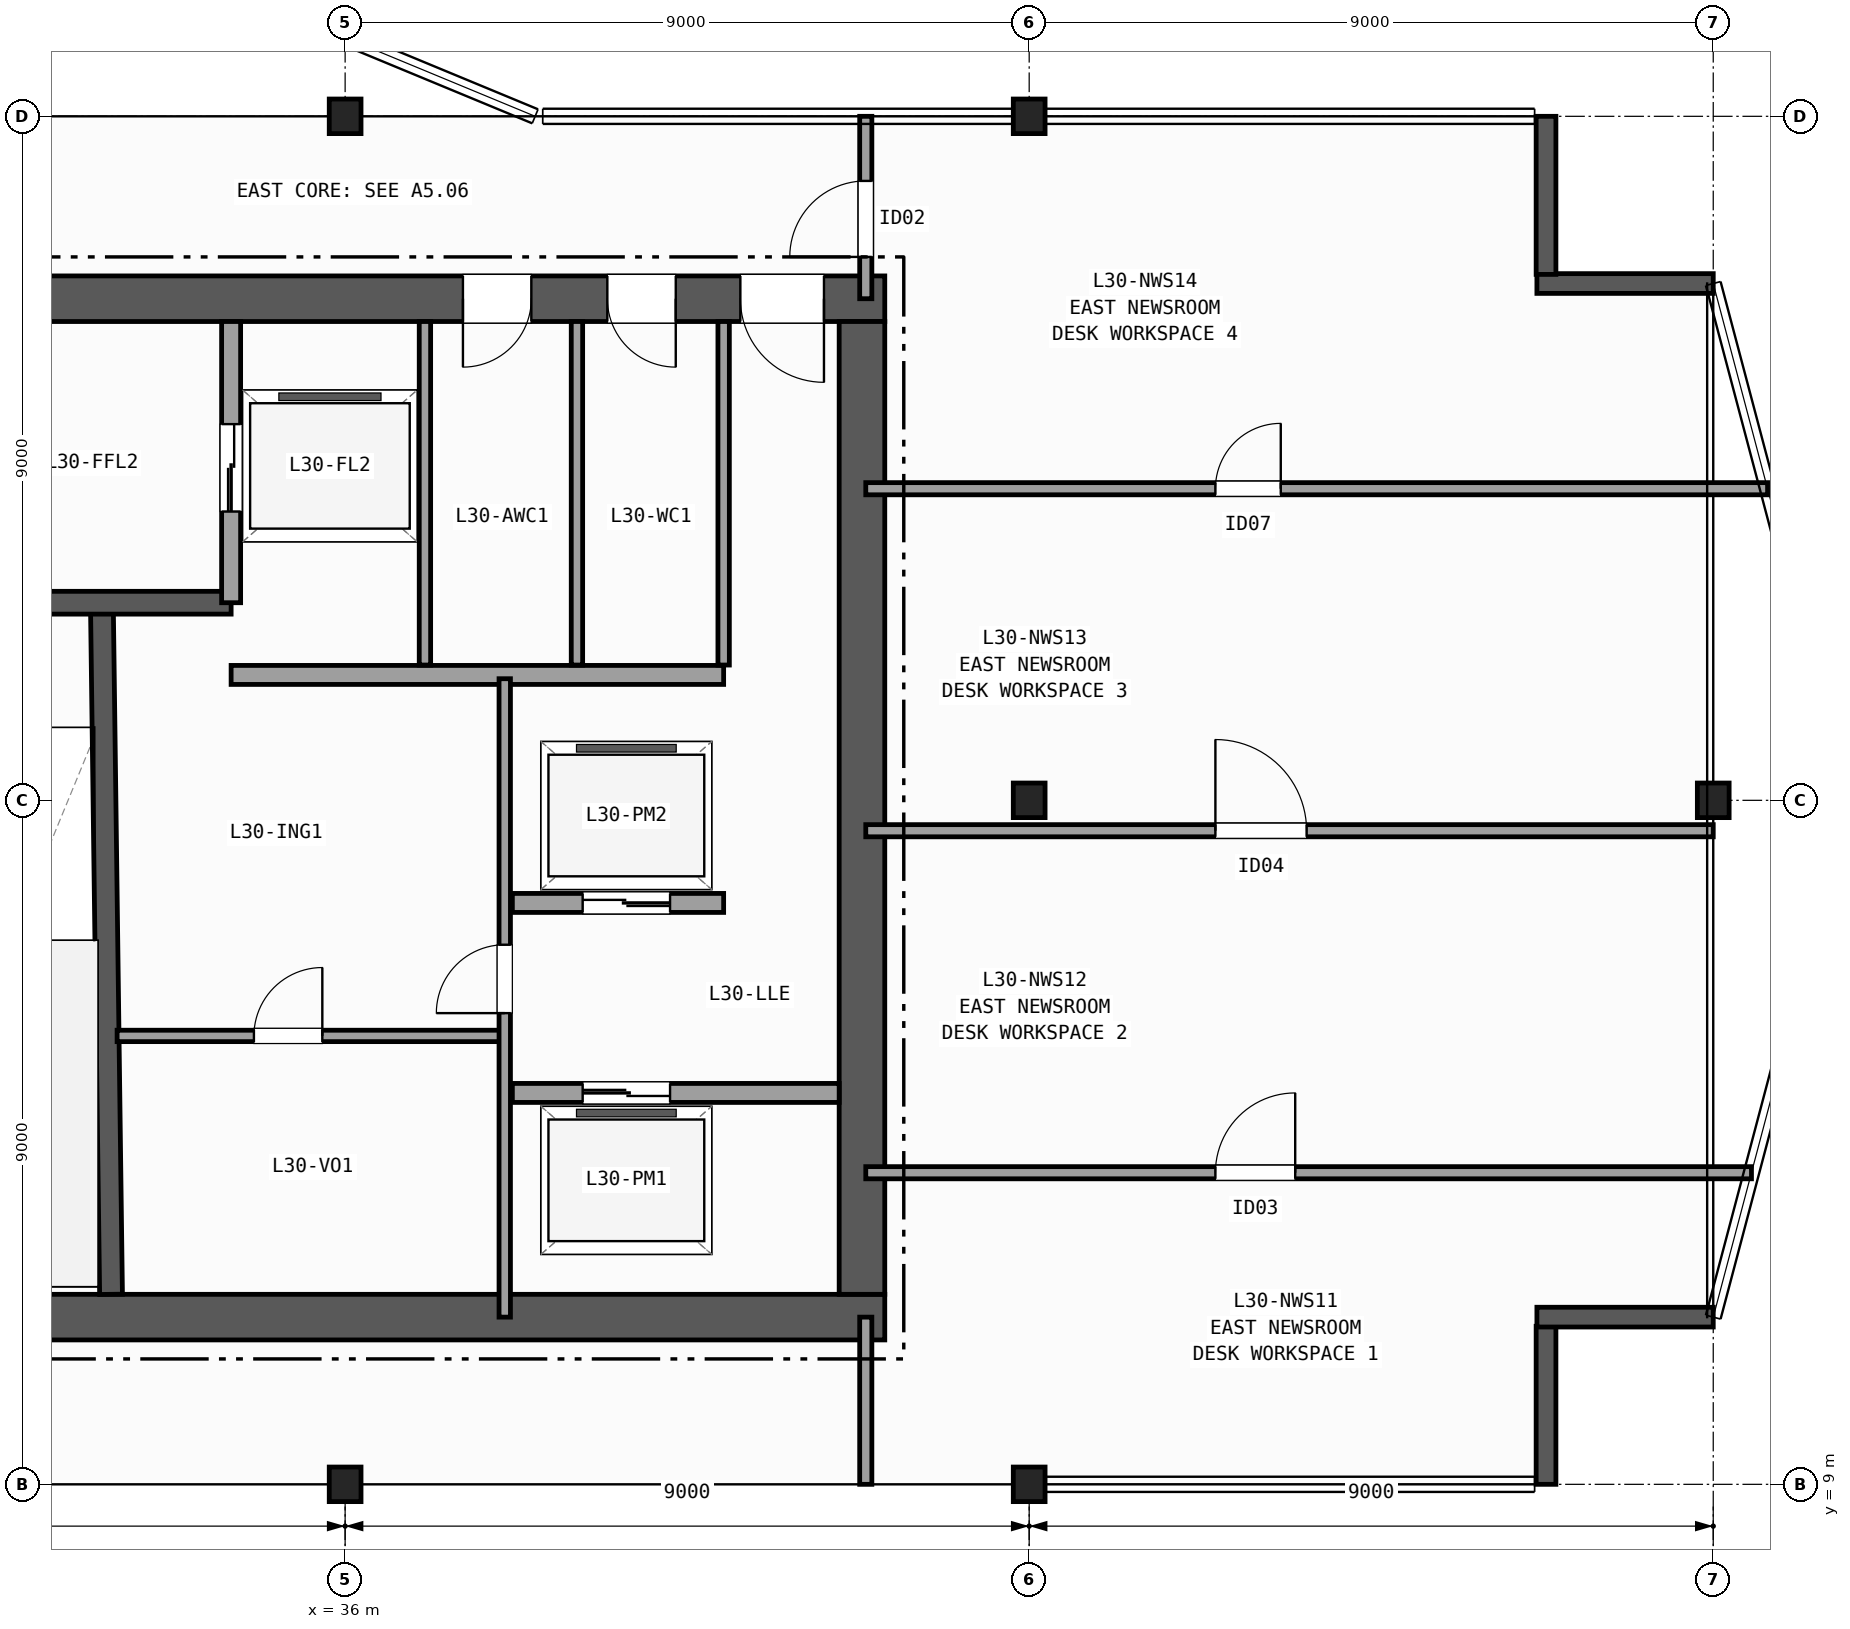
"""IFC4 building model, lengths in metres.
Left out: names, types, materials, properties, quantities, classifications, styles, units other than length and angle.
Written with IfcOpenShell. Run it as: python <this file> out.ifc"""

import sys

from ifc_helpers import new_model, si_unit, direction, frame, frame_2d, origin, origin_2d, place, context, subcontext, project, spatial, rectangle, i_section, extrude, element, fill, save


model = new_model("IFC4")
c1 = context("Model", 3, precision=1e-05, world=origin(), true_north=direction((0.0, 1.0)))
c2 = subcontext(c1, "Body", "Model", "MODEL_VIEW")
j1 = project(units=[si_unit("LENGTHUNIT", "METRE"), si_unit("PLANEANGLEUNIT", "RADIAN")], contexts=[c1])
p1 = place(None, origin())
s1 = spatial("IfcSite", under=j1, at=p1, CompositionType="ELEMENT")
p2 = place(p1, origin())
s2 = spatial("IfcBuilding", under=s1, at=p2, CompositionType="ELEMENT")
p3 = place(p2, frame((0.0, 0.0, 124.8)))
s3 = spatial("IfcBuildingStorey", under=s2, at=p3, CompositionType="ELEMENT", Elevation=124.8)
for number, where, z_axis, x_axis in (
    (1, (36.0, 9.0, 0.0), (0.0, 0.0, 1.0), (1.0, 0.0, 0.0)),
    (2, (36.0, 27.0, 0.0), (0.0, 0.0, 1.0), (1.0, 0.0, 0.0)),
    (3, (45.0, 9.0, 0.0), (0.0, 0.0, 1.0), (1.0, 0.0, 0.0)),
    (4, (45.0, 18.0, 0.0), (0.0, 0.0, 1.0), (1.0, 0.0, 0.0)),
    (5, (45.0, 27.0, 0.0), (0.0, 0.0, 1.0), (1.0, 0.0, 0.0)),
    (6, (54.0, 18.0, 0.0), (0.0, 0.0, 1.0), (1.0, 0.0, 0.0)),
):
    element("IfcColumn", number, at=place(p3, frame(where, z_axis=z_axis, x_axis=x_axis)), inside=s3, PredefinedType="COLUMN", context=c2, shape_type="SweptSolid", body=[
        extrude(i_section(OverallWidth=0.418, OverallDepth=0.455, WebThickness=0.042, FlangeThickness=0.068, FilletRadius=0.015, at=origin_2d()), origin(), (0.0, 0.0, 1.0), 3.7),
    ])
p4 = place(p3, frame((51.8, 9.0, 0.0), z_axis=(0.0, 0.0, 1.0), x_axis=(0.0, 1.0, 0.0)))
e7 = element("IfcWall", 7, at=p4, inside=s3, PredefinedType="SOLIDWALL", context=c2, shape_type="SweptSolid", body=[
    extrude(rectangle(XDim=2.08, YDim=0.26, at=frame_2d((1.04, 0.0))), origin(), (0.0, 0.0, 1.0), 3.42),
])
for number, where, z_axis, x_axis in (
    (8, (51.68, 11.2, 0.0), (0.0, 0.0, 1.0), (1.0, 0.0, 0.0)),
    (9, (54.0, 24.8, 0.0), (0.0, 0.0, 1.0), (-1.0, 0.0, 0.0)),
):
    element("IfcWall", number, at=place(p3, frame(where, z_axis=z_axis, x_axis=x_axis)), inside=s3, PredefinedType="SOLIDWALL", context=c2, shape_type="SweptSolid", body=[
        extrude(rectangle(XDim=2.32, YDim=0.26, at=frame_2d((1.16, 0.0))), origin(), (0.0, 0.0, 1.0), 3.42),
    ])
p5 = place(p3, frame((51.8, 24.92, 0.0), z_axis=(0.0, 0.0, 1.0), x_axis=(0.0, 1.0, 0.0)))
e10 = element("IfcWall", 10, at=p5, inside=s3, PredefinedType="SOLIDWALL", context=c2, shape_type="SweptSolid", body=[
    extrude(rectangle(XDim=2.08, YDim=0.26, at=frame_2d((1.04, 0.0))), origin(), (0.0, 0.0, 1.0), 3.42),
])
p6 = place(p3, frame((29.1, 11.2, 0.0), z_axis=(0.0, 0.0, 1.0), x_axis=(1.0, 0.0, 0.0)))
e11 = element("IfcWall", 11, at=p6, inside=s3, PredefinedType="SHEAR", context=c2, shape_type="SweptSolid", body=[
    extrude(rectangle(XDim=14.0, YDim=0.6, at=frame_2d((7.0, 0.0))), origin(), (0.0, 0.0, 1.0), 3.42),
])
p7 = place(p3, frame((43.1, 24.6, 0.0), z_axis=(0.0, 0.0, 1.0), x_axis=(-1.0, 0.0, 0.0)))
e12 = element("IfcWall", 12, at=p7, inside=s3, PredefinedType="SHEAR", context=c2, shape_type="SweptSolid", body=[
    extrude(rectangle(XDim=14.0, YDim=0.6, at=frame_2d((7.0, 0.0))), origin(), (0.0, 0.0, 1.0), 3.42),
])
p8 = place(p7, frame((0.8, 0.0, 0.0)))
e13 = element("IfcOpeningElement", 13, at=p8, cuts=e12, PredefinedType="OPENING", context=c2, shape_type="SweptSolid", body=[
    extrude(rectangle(XDim=1.1, YDim=2.15, at=frame_2d((0.55, 1.075))), frame((0.0, 0.31, 0.0), z_axis=(0.0, -1.0, 0.0), x_axis=(1.0, 0.0, 0.0)), (0.0, 0.0, 1.0), 0.62),
])
p9 = place(p7, frame((2.75, 0.0, 0.0)))
e14 = element("IfcOpeningElement", 14, at=p9, cuts=e12, PredefinedType="OPENING", context=c2, shape_type="SweptSolid", body=[
    extrude(rectangle(XDim=0.9, YDim=2.1, at=frame_2d((0.45, 1.05))), frame((0.0, 0.31, 0.0), z_axis=(0.0, -1.0, 0.0), x_axis=(1.0, 0.0, 0.0)), (0.0, 0.0, 1.0), 0.62),
])
p10 = place(p7, frame((4.65, 0.0, 0.0)))
e15 = element("IfcOpeningElement", 15, at=p10, cuts=e12, PredefinedType="OPENING", context=c2, shape_type="SweptSolid", body=[
    extrude(rectangle(XDim=0.9, YDim=2.1, at=frame_2d((0.45, 1.05))), frame((0.0, 0.31, 0.0), z_axis=(0.0, -1.0, 0.0), x_axis=(1.0, 0.0, 0.0)), (0.0, 0.0, 1.0), 0.62),
])
p11 = place(p3, frame((42.8, 11.5, 0.0), z_axis=(0.0, 0.0, 1.0), x_axis=(0.0, 1.0, 0.0)))
e16 = element("IfcWall", 16, at=p11, inside=s3, PredefinedType="SHEAR", context=c2, shape_type="SweptSolid", body=[
    extrude(rectangle(XDim=12.8, YDim=0.6, at=frame_2d((6.4, 0.0))), origin(), (0.0, 0.0, 1.0), 3.42),
])
p12 = place(p3, frame((32.92, 11.5, 0.0), z_axis=(0.0, 0.0, 1.0), x_axis=(-0.013244407292, 0.999912288991, 0.0)))
e17 = element("IfcWall", 17, at=p12, inside=s3, PredefinedType="SHEAR", context=c2, shape_type="SweptSolid", body=[
    extrude(rectangle(XDim=9.051, YDim=0.3, at=frame_2d((4.525, 0.0))), origin(), (0.0, 0.0, 1.0), 3.42),
])
p13 = place(p3, frame((34.5, 20.6, 0.0), z_axis=(0.0, 0.0, 1.0), x_axis=(-1.0, 0.0, 0.0)))
e18 = element("IfcWall", 18, at=p13, inside=s3, PredefinedType="SHEAR", context=c2, shape_type="SweptSolid", body=[
    extrude(rectangle(XDim=4.8, YDim=0.3, at=frame_2d((2.4, 0.0))), origin(), (0.0, 0.0, 1.0), 3.42),
])
p14 = place(p13, frame((2.7, 0.0, 0.0)))
e19 = element("IfcOpeningElement", 19, at=p14, cuts=e18, PredefinedType="OPENING", context=c2, shape_type="SweptSolid", body=[
    extrude(rectangle(XDim=1.2, YDim=2.15, at=frame_2d((0.6, 1.075))), frame((0.0, 0.16, 0.0), z_axis=(0.0, -1.0, 0.0), x_axis=(1.0, 0.0, 0.0)), (0.0, 0.0, 1.0), 0.32),
])
p15 = place(p3, frame((34.5, 20.6, 0.0), z_axis=(0.0, 0.0, 1.0), x_axis=(0.0, 1.0, 0.0)))
e20 = element("IfcWall", 20, at=p15, inside=s3, PredefinedType="PARTITIONING", context=c2, shape_type="SweptSolid", body=[
    extrude(rectangle(XDim=3.7, YDim=0.25, at=frame_2d((1.85, 0.0))), origin(), (0.0, 0.0, 1.0), 3.42),
])
p16 = place(p15, frame((1.2, 0.0, 0.0)))
e21 = element("IfcOpeningElement", 21, at=p16, cuts=e20, PredefinedType="OPENING", context=c2, shape_type="SweptSolid", body=[
    extrude(rectangle(XDim=1.15, YDim=2.15, at=frame_2d((0.575, 1.075))), frame((0.0, 0.135, 0.0), z_axis=(0.0, -1.0, 0.0), x_axis=(1.0, 0.0, 0.0)), (0.0, 0.0, 1.0), 0.27),
])
p17 = place(p3, frame((34.5, 19.65, 0.0), z_axis=(0.0, 0.0, 1.0), x_axis=(1.0, 0.0, 0.0)))
e22 = element("IfcWall", 22, at=p17, inside=s3, PredefinedType="PARTITIONING", context=c2, shape_type="SweptSolid", body=[
    extrude(rectangle(XDim=6.48, YDim=0.25, at=frame_2d((3.24, 0.0))), origin(), (0.0, 0.0, 1.0), 3.42),
])
p18 = place(p3, frame((38.2, 14.15, 0.0), z_axis=(0.0, 0.0, 1.0), x_axis=(1.0, 0.0, 0.0)))
e23 = element("IfcWall", 23, at=p18, inside=s3, PredefinedType="PARTITIONING", context=c2, shape_type="SweptSolid", body=[
    extrude(rectangle(XDim=4.3, YDim=0.25, at=frame_2d((2.15, 0.0))), origin(), (0.0, 0.0, 1.0), 3.42),
])
p19 = place(p18, frame((0.925, 0.0, 0.0)))
e24 = element("IfcOpeningElement", 24, at=p19, cuts=e23, PredefinedType="OPENING", context=c2, shape_type="SweptSolid", body=[
    extrude(rectangle(XDim=1.15, YDim=2.15, at=frame_2d((0.575, 1.075))), frame((0.0, 0.135, 0.0), z_axis=(0.0, -1.0, 0.0), x_axis=(1.0, 0.0, 0.0)), (0.0, 0.0, 1.0), 0.27),
])
p20 = place(p3, frame((40.98, 16.65, 0.0), z_axis=(0.0, 0.0, 1.0), x_axis=(-1.0, 0.0, 0.0)))
e25 = element("IfcWall", 25, at=p20, inside=s3, PredefinedType="PARTITIONING", context=c2, shape_type="SweptSolid", body=[
    extrude(rectangle(XDim=2.78, YDim=0.25, at=frame_2d((1.39, 0.0))), origin(), (0.0, 0.0, 1.0), 3.42),
])
p21 = place(p20, frame((0.705, 0.0, 0.0)))
e26 = element("IfcOpeningElement", 26, at=p21, cuts=e25, PredefinedType="OPENING", context=c2, shape_type="SweptSolid", body=[
    extrude(rectangle(XDim=1.15, YDim=2.15, at=frame_2d((0.575, 1.075))), frame((0.0, 0.135, 0.0), z_axis=(0.0, -1.0, 0.0), x_axis=(1.0, 0.0, 0.0)), (0.0, 0.0, 1.0), 0.27),
])
p22 = place(p3, frame((33.0, 14.9, 0.0), z_axis=(0.0, 0.0, 1.0), x_axis=(1.0, 0.0, 0.0)))
e27 = element("IfcWall", 27, at=p22, inside=s3, PredefinedType="PARTITIONING", context=c2, shape_type="SweptSolid", body=[
    extrude(rectangle(XDim=5.1, YDim=0.15, at=frame_2d((2.55, 0.0))), origin(), (0.0, 0.0, 1.0), 3.42),
])
p23 = place(p22, frame((1.8, 0.0, 0.0)))
e28 = element("IfcOpeningElement", 28, at=p23, cuts=e27, PredefinedType="OPENING", context=c2, shape_type="SweptSolid", body=[
    extrude(rectangle(XDim=0.9, YDim=2.1, at=frame_2d((0.45, 1.05))), frame((0.0, 0.085, 0.0), z_axis=(0.0, -1.0, 0.0), x_axis=(1.0, 0.0, 0.0)), (0.0, 0.0, 1.0), 0.17),
])
p24 = place(p3, frame((38.1, 11.2, 0.0), z_axis=(0.0, 0.0, 1.0), x_axis=(0.0, 1.0, 0.0)))
e29 = element("IfcWall", 29, at=p24, inside=s3, PredefinedType="PARTITIONING", context=c2, shape_type="SweptSolid", body=[
    extrude(rectangle(XDim=8.4, YDim=0.15, at=frame_2d((4.2, 0.0))), origin(), (0.0, 0.0, 1.0), 3.42),
])
p25 = place(p24, frame((4.0, 0.0, 0.0)))
e30 = element("IfcOpeningElement", 30, at=p25, cuts=e29, PredefinedType="OPENING", context=c2, shape_type="SweptSolid", body=[
    extrude(rectangle(XDim=0.9, YDim=2.1, at=frame_2d((0.45, 1.05))), frame((0.0, 0.085, 0.0), z_axis=(0.0, -1.0, 0.0), x_axis=(1.0, 0.0, 0.0)), (0.0, 0.0, 1.0), 0.17),
])
for number, where, z_axis, x_axis in (
    (31, (37.05, 19.78, 0.0), (0.0, 0.0, 1.0), (0.0, 1.0, 0.0)),
    (32, (39.05, 19.78, 0.0), (0.0, 0.0, 1.0), (0.0, 1.0, 0.0)),
    (33, (40.98, 19.78, 0.0), (0.0, 0.0, 1.0), (0.0, 1.0, 0.0)),
):
    element("IfcWall", number, at=place(p3, frame(where, z_axis=z_axis, x_axis=x_axis)), inside=s3, PredefinedType="PARTITIONING", context=c2, shape_type="SweptSolid", body=[
        extrude(rectangle(XDim=4.52, YDim=0.15, at=frame_2d((2.26, 0.0))), origin(), (0.0, 0.0, 1.0), 3.42),
    ])
p26 = place(p3, frame((42.85, 9.0, 0.0), z_axis=(0.0, 0.0, 1.0), x_axis=(0.0, 1.0, 0.0)))
e34 = element("IfcWall", 34, at=p26, inside=s3, PredefinedType="PARTITIONING", context=c2, shape_type="SweptSolid", body=[
    extrude(rectangle(XDim=2.2, YDim=0.16, at=frame_2d((1.1, 0.0))), origin(), (0.0, 0.0, 1.0), 2.634),
])
p27 = place(p3, frame((42.85, 24.6, 0.0), z_axis=(0.0, 0.0, 1.0), x_axis=(0.0, 1.0, 0.0)))
e35 = element("IfcWall", 35, at=p27, inside=s3, PredefinedType="PARTITIONING", context=c2, shape_type="SweptSolid", body=[
    extrude(rectangle(XDim=2.4, YDim=0.16, at=frame_2d((1.2, 0.0))), origin(), (0.0, 0.0, 1.0), 2.634),
])
p28 = place(p27, frame((0.55, 0.0, 0.0)))
e36 = element("IfcOpeningElement", 36, at=p28, cuts=e35, PredefinedType="OPENING", context=c2, shape_type="SweptSolid", body=[
    extrude(rectangle(XDim=1.0, YDim=2.1, at=frame_2d((0.5, 1.05))), frame((0.0, 0.09, 0.0), z_axis=(0.0, -1.0, 0.0), x_axis=(1.0, 0.0, 0.0)), (0.0, 0.0, 1.0), 0.18),
])
p29 = place(p3, frame((42.85, 13.1, 0.0), z_axis=(0.0, 0.0, 1.0), x_axis=(1.0, 0.0, 0.0)))
e37 = element("IfcWall", 37, at=p29, inside=s3, PredefinedType="PARTITIONING", context=c2, shape_type="SweptSolid", body=[
    extrude(rectangle(XDim=11.653, YDim=0.16, at=frame_2d((5.826, 0.0))), origin(), (0.0, 0.0, 1.0), 3.42),
])
p30 = place(p29, frame((4.6, 0.0, 0.0)))
e38 = element("IfcOpeningElement", 38, at=p30, cuts=e37, PredefinedType="OPENING", context=c2, shape_type="SweptSolid", body=[
    extrude(rectangle(XDim=1.05, YDim=2.15, at=frame_2d((0.525, 1.075))), frame((0.0, 0.09, 0.0), z_axis=(0.0, -1.0, 0.0), x_axis=(1.0, 0.0, 0.0)), (0.0, 0.0, 1.0), 0.18),
])
p31 = place(p3, frame((42.85, 17.6, 0.0), z_axis=(0.0, 0.0, 1.0), x_axis=(1.0, 0.0, 0.0)))
e39 = element("IfcWall", 39, at=p31, inside=s3, PredefinedType="PARTITIONING", context=c2, shape_type="SweptSolid", body=[
    extrude(rectangle(XDim=11.15, YDim=0.16, at=frame_2d((5.575, 0.0))), origin(), (0.0, 0.0, 1.0), 3.42),
])
p32 = place(p31, frame((4.6, 0.0, 0.0)))
e40 = element("IfcOpeningElement", 40, at=p32, cuts=e39, PredefinedType="OPENING", context=c2, shape_type="SweptSolid", body=[
    extrude(rectangle(XDim=1.2, YDim=2.15, at=frame_2d((0.6, 1.075))), frame((0.0, 0.09, 0.0), z_axis=(0.0, -1.0, 0.0), x_axis=(1.0, 0.0, 0.0)), (0.0, 0.0, 1.0), 0.18),
])
p33 = place(p3, frame((42.85, 22.1, 0.0), z_axis=(0.0, 0.0, 1.0), x_axis=(1.0, 0.0, 0.0)))
e41 = element("IfcWall", 41, at=p33, inside=s3, PredefinedType="PARTITIONING", context=c2, shape_type="SweptSolid", body=[
    extrude(rectangle(XDim=11.865, YDim=0.16, at=frame_2d((5.933, 0.0))), origin(), (0.0, 0.0, 1.0), 3.42),
])
p34 = place(p33, frame((4.6, 0.0, 0.0)))
e42 = element("IfcOpeningElement", 42, at=p34, cuts=e41, PredefinedType="OPENING", context=c2, shape_type="SweptSolid", body=[
    extrude(rectangle(XDim=0.86, YDim=2.05, at=frame_2d((0.43, 1.025))), frame((0.0, 0.09, 0.0), z_axis=(0.0, -1.0, 0.0), x_axis=(1.0, 0.0, 0.0)), (0.0, 0.0, 1.0), 0.18),
])
p35 = place(p8, origin())
e43 = element("IfcDoor", 43, at=p35, inside=s3, OperationType="SINGLE_SWING_LEFT", PredefinedType="DOOR", context=c2, shape_type="SweptSolid", body=[
    extrude(rectangle(XDim=1.1, YDim=2.15, at=frame_2d((0.55, 1.075))), frame((0.0, 0.025, 0.0), z_axis=(0.0, -1.0, 0.0), x_axis=(1.0, 0.0, 0.0)), (0.0, 0.0, 1.0), 0.05),
])
fill(e13, e43)
p36 = place(p9, origin())
e44 = element("IfcDoor", 44, at=p36, inside=s3, OperationType="SINGLE_SWING_LEFT", PredefinedType="DOOR", context=c2, shape_type="SweptSolid", body=[
    extrude(rectangle(XDim=0.9, YDim=2.1, at=frame_2d((0.45, 1.05))), frame((0.0, 0.025, 0.0), z_axis=(0.0, -1.0, 0.0), x_axis=(1.0, 0.0, 0.0)), (0.0, 0.0, 1.0), 0.05),
])
fill(e14, e44)
p37 = place(p10, origin())
e45 = element("IfcDoor", 45, at=p37, inside=s3, OperationType="SINGLE_SWING_RIGHT", PredefinedType="DOOR", context=c2, shape_type="SweptSolid", body=[
    extrude(rectangle(XDim=0.9, YDim=2.1, at=frame_2d((0.45, 1.05))), frame((0.0, 0.025, 0.0), z_axis=(0.0, -1.0, 0.0), x_axis=(1.0, 0.0, 0.0)), (0.0, 0.0, 1.0), 0.05),
])
fill(e15, e45)
p38 = place(p16, origin())
e46 = element("IfcDoor", 46, at=p38, inside=s3, OperationType="DOUBLE_DOOR_SLIDING", PredefinedType="DOOR", context=c2, shape_type="SweptSolid", body=[
    extrude(rectangle(XDim=1.15, YDim=2.15, at=frame_2d((0.575, 1.075))), frame((0.0, 0.025, 0.0), z_axis=(0.0, -1.0, 0.0), x_axis=(1.0, 0.0, 0.0)), (0.0, 0.0, 1.0), 0.05),
])
fill(e21, e46)
p39 = place(p19, origin())
e47 = element("IfcDoor", 47, at=p39, inside=s3, OperationType="DOUBLE_DOOR_SLIDING", PredefinedType="DOOR", context=c2, shape_type="SweptSolid", body=[
    extrude(rectangle(XDim=1.15, YDim=2.15, at=frame_2d((0.575, 1.075))), frame((0.0, 0.025, 0.0), z_axis=(0.0, -1.0, 0.0), x_axis=(1.0, 0.0, 0.0)), (0.0, 0.0, 1.0), 0.05),
])
fill(e24, e47)
p40 = place(p21, origin())
e48 = element("IfcDoor", 48, at=p40, inside=s3, OperationType="DOUBLE_DOOR_SLIDING", PredefinedType="DOOR", context=c2, shape_type="SweptSolid", body=[
    extrude(rectangle(XDim=1.15, YDim=2.15, at=frame_2d((0.575, 1.075))), frame((0.0, 0.025, 0.0), z_axis=(0.0, -1.0, 0.0), x_axis=(1.0, 0.0, 0.0)), (0.0, 0.0, 1.0), 0.05),
])
fill(e26, e48)
p41 = place(p25, origin())
e49 = element("IfcDoor", 49, at=p41, inside=s3, OperationType="SINGLE_SWING_LEFT", PredefinedType="DOOR", context=c2, shape_type="SweptSolid", body=[
    extrude(rectangle(XDim=0.9, YDim=2.1, at=frame_2d((0.45, 1.05))), frame((0.0, 0.025, 0.0), z_axis=(0.0, -1.0, 0.0), x_axis=(1.0, 0.0, 0.0)), (0.0, 0.0, 1.0), 0.05),
])
fill(e30, e49)
p42 = place(p23, origin())
e50 = element("IfcDoor", 50, at=p42, inside=s3, OperationType="SINGLE_SWING_RIGHT", PredefinedType="DOOR", context=c2, shape_type="SweptSolid", body=[
    extrude(rectangle(XDim=0.9, YDim=2.1, at=frame_2d((0.45, 1.05))), frame((0.0, 0.025, 0.0), z_axis=(0.0, -1.0, 0.0), x_axis=(1.0, 0.0, 0.0)), (0.0, 0.0, 1.0), 0.05),
])
fill(e28, e50)
p43 = place(p28, origin())
e51 = element("IfcDoor", 51, at=p43, inside=s3, OperationType="SINGLE_SWING_LEFT", PredefinedType="DOOR", context=c2, shape_type="SweptSolid", body=[
    extrude(rectangle(XDim=1.0, YDim=2.1, at=frame_2d((0.5, 1.05))), frame((0.0, 0.025, 0.0), z_axis=(0.0, -1.0, 0.0), x_axis=(1.0, 0.0, 0.0)), (0.0, 0.0, 1.0), 0.05),
])
fill(e36, e51)
p44 = place(p30, origin())
e52 = element("IfcDoor", 52, at=p44, inside=s3, OperationType="SINGLE_SWING_RIGHT", PredefinedType="DOOR", context=c2, shape_type="SweptSolid", body=[
    extrude(rectangle(XDim=1.05, YDim=2.15, at=frame_2d((0.525, 1.075))), frame((0.0, 0.025, 0.0), z_axis=(0.0, -1.0, 0.0), x_axis=(1.0, 0.0, 0.0)), (0.0, 0.0, 1.0), 0.05),
])
fill(e38, e52)
p45 = place(p32, origin())
e53 = element("IfcDoor", 53, at=p45, inside=s3, OperationType="SINGLE_SWING_LEFT", PredefinedType="DOOR", context=c2, shape_type="SweptSolid", body=[
    extrude(rectangle(XDim=1.2, YDim=2.15, at=frame_2d((0.6, 1.075))), frame((0.0, 0.025, 0.0), z_axis=(0.0, -1.0, 0.0), x_axis=(1.0, 0.0, 0.0)), (0.0, 0.0, 1.0), 0.05),
])
fill(e40, e53)
p46 = place(p34, origin())
e54 = element("IfcDoor", 54, at=p46, inside=s3, OperationType="SINGLE_SWING_RIGHT", PredefinedType="DOOR", context=c2, shape_type="SweptSolid", body=[
    extrude(rectangle(XDim=0.86, YDim=2.05, at=frame_2d((0.43, 1.025))), frame((0.0, 0.025, 0.0), z_axis=(0.0, -1.0, 0.0), x_axis=(1.0, 0.0, 0.0)), (0.0, 0.0, 1.0), 0.05),
])
fill(e42, e54)
save(model, sys.argv[1])
